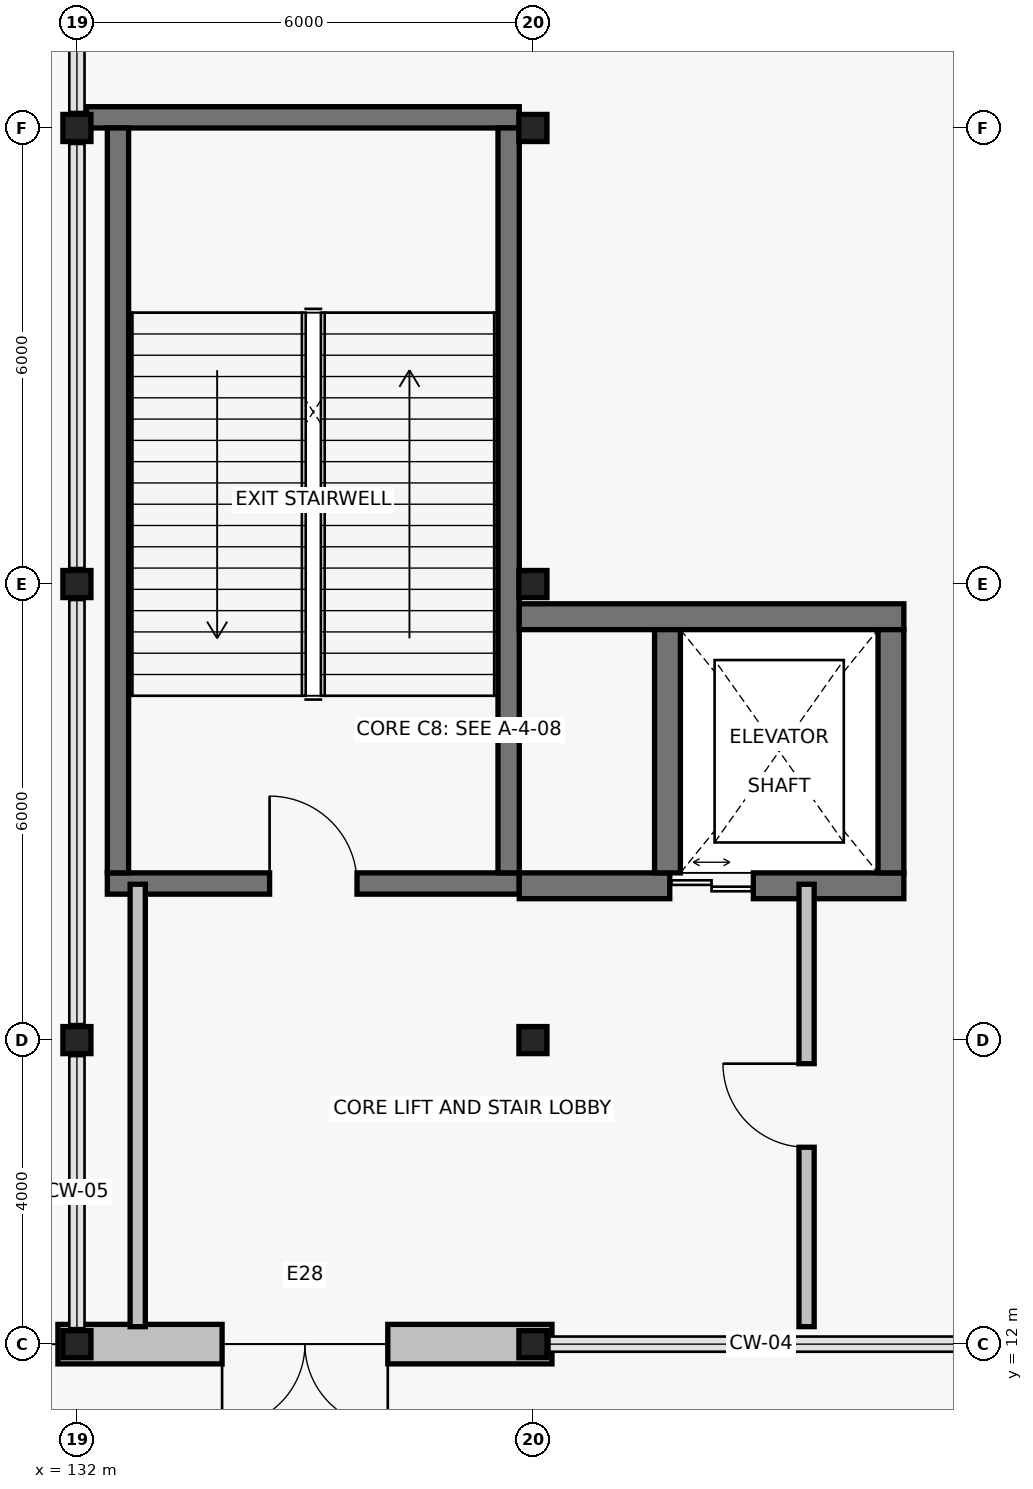
"""IFC4 building model, lengths in metres.
Left out: names, types, materials, properties, quantities, classifications, styles, units other than length and angle.
Written with IfcOpenShell. Run it as: python <this file> out.ifc"""

import sys

from ifc_helpers import new_model, si_unit, direction, frame, frame_2d, origin, origin_2d, place, context, subcontext, project, spatial, rectangle, i_section, extrude, element, fill, save


model = new_model("IFC4")
c1 = context("Model", 3, precision=1e-05, world=origin(), true_north=direction((0.0, 1.0)))
c2 = subcontext(c1, "Body", "Model", "MODEL_VIEW")
j1 = project(units=[si_unit("LENGTHUNIT", "METRE"), si_unit("PLANEANGLEUNIT", "RADIAN")], contexts=[c1])
p1 = place(None, origin())
s1 = spatial("IfcSite", under=j1, at=p1, CompositionType="ELEMENT")
p2 = place(p1, origin())
s2 = spatial("IfcBuilding", under=s1, at=p2, CompositionType="ELEMENT")
p3 = place(p2, origin())
s3 = spatial("IfcBuildingStorey", under=s2, at=p3, CompositionType="ELEMENT", Elevation=0.0)
for number, where, z_axis, x_axis in (
    (1, (132.0, 12.0, 0.0), (0.0, 0.0, 1.0), (1.0, 0.0, 0.0)),
    (2, (132.0, 16.0, 0.0), (0.0, 0.0, 1.0), (1.0, 0.0, 0.0)),
    (3, (132.0, 22.0, 0.0), (0.0, 0.0, 1.0), (1.0, 0.0, 0.0)),
    (4, (132.0, 28.0, 0.0), (0.0, 0.0, 1.0), (1.0, 0.0, 0.0)),
    (5, (138.0, 12.0, 0.0), (0.0, 0.0, 1.0), (1.0, 0.0, 0.0)),
    (6, (138.0, 16.0, 0.0), (0.0, 0.0, 1.0), (1.0, 0.0, 0.0)),
    (7, (138.0, 22.0, 0.0), (0.0, 0.0, 1.0), (1.0, 0.0, 0.0)),
    (8, (138.0, 28.0, 0.0), (0.0, 0.0, 1.0), (1.0, 0.0, 0.0)),
):
    element("IfcColumn", number, at=place(p3, frame(where, z_axis=z_axis, x_axis=x_axis)), inside=s3, PredefinedType="COLUMN", context=c2, shape_type="SweptSolid", body=[
        extrude(i_section(OverallWidth=0.369, OverallDepth=0.356, WebThickness=0.011, FlangeThickness=0.018, FilletRadius=0.015, at=origin_2d()), origin(), (0.0, 0.0, 1.0), 6.6),
    ])
p4 = place(p3, frame((138.25, 12.0, 0.0), z_axis=(0.0, 0.0, 1.0), x_axis=(-1.0, 0.0, 0.0)))
e9 = element("IfcWall", 9, at=p4, inside=s3, PredefinedType="SOLIDWALL", context=c2, shape_type="SweptSolid", body=[
    extrude(rectangle(XDim=6.5, YDim=0.52, at=frame_2d((3.25, 0.0))), origin(), (0.0, 0.0, 1.0), 5.837),
])
p5 = place(p4, frame((2.16, 0.0, 0.0)))
e10 = element("IfcOpeningElement", 10, at=p5, cuts=e9, PredefinedType="OPENING", context=c2, shape_type="SweptSolid", body=[
    extrude(rectangle(XDim=2.18, YDim=2.55, at=frame_2d((1.09, 1.275))), frame((0.0, 0.275, 0.0), z_axis=(0.0, -1.0, 0.0), x_axis=(1.0, 0.0, 0.0)), (0.0, 0.0, 1.0), 0.55),
])
p6 = place(p3, frame((132.4, 18.06, 0.0), z_axis=(0.0, 0.0, 1.0), x_axis=(1.0, 0.0, 0.0)))
e11 = element("IfcWall", 11, at=p6, inside=s3, PredefinedType="SHEAR", context=c2, shape_type="SweptSolid", body=[
    extrude(rectangle(XDim=5.42, YDim=0.28, at=frame_2d((2.71, 0.0))), origin(), (0.0, 0.0, 1.0), 6.32),
])
p7 = place(p6, frame((2.135, 0.0, 0.0)))
e12 = element("IfcOpeningElement", 12, at=p7, cuts=e11, PredefinedType="OPENING", context=c2, shape_type="SweptSolid", body=[
    extrude(rectangle(XDim=1.15, YDim=2.15, at=frame_2d((0.575, 1.075))), frame((0.0, 0.155, 0.0), z_axis=(0.0, -1.0, 0.0), x_axis=(1.0, 0.0, 0.0)), (0.0, 0.0, 1.0), 0.31),
])
p8 = place(p3, frame((137.82, 28.14, 0.0), z_axis=(0.0, 0.0, 1.0), x_axis=(-1.0, 0.0, 0.0)))
e13 = element("IfcWall", 13, at=p8, inside=s3, PredefinedType="SHEAR", context=c2, shape_type="SweptSolid", body=[
    extrude(rectangle(XDim=5.695, YDim=0.28, at=frame_2d((2.848, 0.0))), origin(), (0.0, 0.0, 1.0), 6.32),
])
for number, where, z_axis, x_axis in (
    (14, (132.54, 28.0, 0.0), (0.0, 0.0, 1.0), (0.0, -1.0, 0.0)),
    (15, (137.68, 18.2, 0.0), (0.0, 0.0, 1.0), (0.0, 1.0, 0.0)),
):
    element("IfcWall", number, at=place(p3, frame(where, z_axis=z_axis, x_axis=x_axis)), inside=s3, PredefinedType="SHEAR", context=c2, shape_type="SweptSolid", body=[
        extrude(rectangle(XDim=9.8, YDim=0.28, at=frame_2d((4.9, 0.0))), origin(), (0.0, 0.0, 1.0), 6.32),
    ])
p9 = place(p3, frame((137.82, 18.03, 0.0), z_axis=(0.0, 0.0, 1.0), x_axis=(1.0, 0.0, 0.0)))
e16 = element("IfcWall", 16, at=p9, inside=s3, PredefinedType="SHEAR", context=c2, shape_type="SweptSolid", body=[
    extrude(rectangle(XDim=5.06, YDim=0.34, at=frame_2d((2.53, 0.0))), origin(), (0.0, 0.0, 1.0), 6.32),
])
p10 = place(p9, frame((1.98, 0.0, 0.0)))
e17 = element("IfcOpeningElement", 17, at=p10, cuts=e16, PredefinedType="OPENING", context=c2, shape_type="SweptSolid", body=[
    extrude(rectangle(XDim=1.1, YDim=2.2, at=frame_2d((0.55, 1.1))), frame((0.0, 0.185, 0.0), z_axis=(0.0, -1.0, 0.0), x_axis=(1.0, 0.0, 0.0)), (0.0, 0.0, 1.0), 0.37),
])
p11 = place(p3, frame((142.88, 21.57, 0.0), z_axis=(0.0, 0.0, 1.0), x_axis=(-1.0, 0.0, 0.0)))
e18 = element("IfcWall", 18, at=p11, inside=s3, PredefinedType="SHEAR", context=c2, shape_type="SweptSolid", body=[
    extrude(rectangle(XDim=5.06, YDim=0.34, at=frame_2d((2.53, 0.0))), origin(), (0.0, 0.0, 1.0), 6.32),
])
for number, where, z_axis, x_axis in (
    (19, (139.77, 21.4, 0.0), (0.0, 0.0, 1.0), (0.0, -1.0, 0.0)),
    (20, (142.71, 18.2, 0.0), (0.0, 0.0, 1.0), (0.0, 1.0, 0.0)),
):
    element("IfcWall", number, at=place(p3, frame(where, z_axis=z_axis, x_axis=x_axis)), inside=s3, PredefinedType="SHEAR", context=c2, shape_type="SweptSolid", body=[
        extrude(rectangle(XDim=3.2, YDim=0.34, at=frame_2d((1.6, 0.0))), origin(), (0.0, 0.0, 1.0), 6.32),
    ])
p12 = place(p3, frame((132.8, 18.05, 0.0), z_axis=(0.0, 0.0, 1.0), x_axis=(0.0, -1.0, 0.0)))
e21 = element("IfcWall", 21, at=p12, inside=s3, PredefinedType="PARTITIONING", context=c2, shape_type="SweptSolid", body=[
    extrude(rectangle(XDim=5.82, YDim=0.2, at=frame_2d((2.91, 0.0))), origin(), (0.0, 0.0, 1.0), 5.837),
])
p13 = place(p3, frame((141.6, 12.23, 0.0), z_axis=(0.0, 0.0, 1.0), x_axis=(0.0, 1.0, 0.0)))
e22 = element("IfcWall", 22, at=p13, inside=s3, PredefinedType="PARTITIONING", context=c2, shape_type="SweptSolid", body=[
    extrude(rectangle(XDim=5.82, YDim=0.2, at=frame_2d((2.91, 0.0))), origin(), (0.0, 0.0, 1.0), 5.89),
])
p14 = place(p13, frame((2.36, 0.0, 0.0)))
e23 = element("IfcOpeningElement", 23, at=p14, cuts=e22, PredefinedType="OPENING", context=c2, shape_type="SweptSolid", body=[
    extrude(rectangle(XDim=1.1, YDim=2.15, at=frame_2d((0.55, 1.075))), frame((0.0, 0.115, 0.0), z_axis=(0.0, -1.0, 0.0), x_axis=(1.0, 0.0, 0.0)), (0.0, 0.0, 1.0), 0.23),
])
p15 = place(p5, origin())
e24 = element("IfcDoor", 24, at=p15, inside=s3, OperationType="DOUBLE_DOOR_SINGLE_SWING", PredefinedType="DOOR", context=c2, shape_type="SweptSolid", body=[
    extrude(rectangle(XDim=2.18, YDim=2.55, at=frame_2d((1.09, 1.275))), frame((0.0, 0.025, 0.0), z_axis=(0.0, -1.0, 0.0), x_axis=(1.0, 0.0, 0.0)), (0.0, 0.0, 1.0), 0.05),
])
fill(e10, e24)
p16 = place(p7, origin())
e25 = element("IfcDoor", 25, at=p16, inside=s3, OperationType="SINGLE_SWING_LEFT", PredefinedType="DOOR", context=c2, shape_type="SweptSolid", body=[
    extrude(rectangle(XDim=1.15, YDim=2.15, at=frame_2d((0.575, 1.075))), frame((0.0, 0.025, 0.0), z_axis=(0.0, -1.0, 0.0), x_axis=(1.0, 0.0, 0.0)), (0.0, 0.0, 1.0), 0.05),
])
fill(e12, e25)
p17 = place(p10, origin())
e26 = element("IfcDoor", 26, at=p17, inside=s3, OperationType="DOUBLE_DOOR_SLIDING", PredefinedType="DOOR", context=c2, shape_type="SweptSolid", body=[
    extrude(rectangle(XDim=1.1, YDim=2.2, at=frame_2d((0.55, 1.1))), frame((0.0, 0.025, 0.0), z_axis=(0.0, -1.0, 0.0), x_axis=(1.0, 0.0, 0.0)), (0.0, 0.0, 1.0), 0.05),
])
fill(e17, e26)
p18 = place(p14, origin())
e27 = element("IfcDoor", 27, at=p18, inside=s3, OperationType="SINGLE_SWING_RIGHT", PredefinedType="DOOR", context=c2, shape_type="SweptSolid", body=[
    extrude(rectangle(XDim=1.1, YDim=2.15, at=frame_2d((0.55, 1.075))), frame((0.0, 0.025, 0.0), z_axis=(0.0, -1.0, 0.0), x_axis=(1.0, 0.0, 0.0)), (0.0, 0.0, 1.0), 0.05),
])
fill(e23, e27)
save(model, sys.argv[1])
